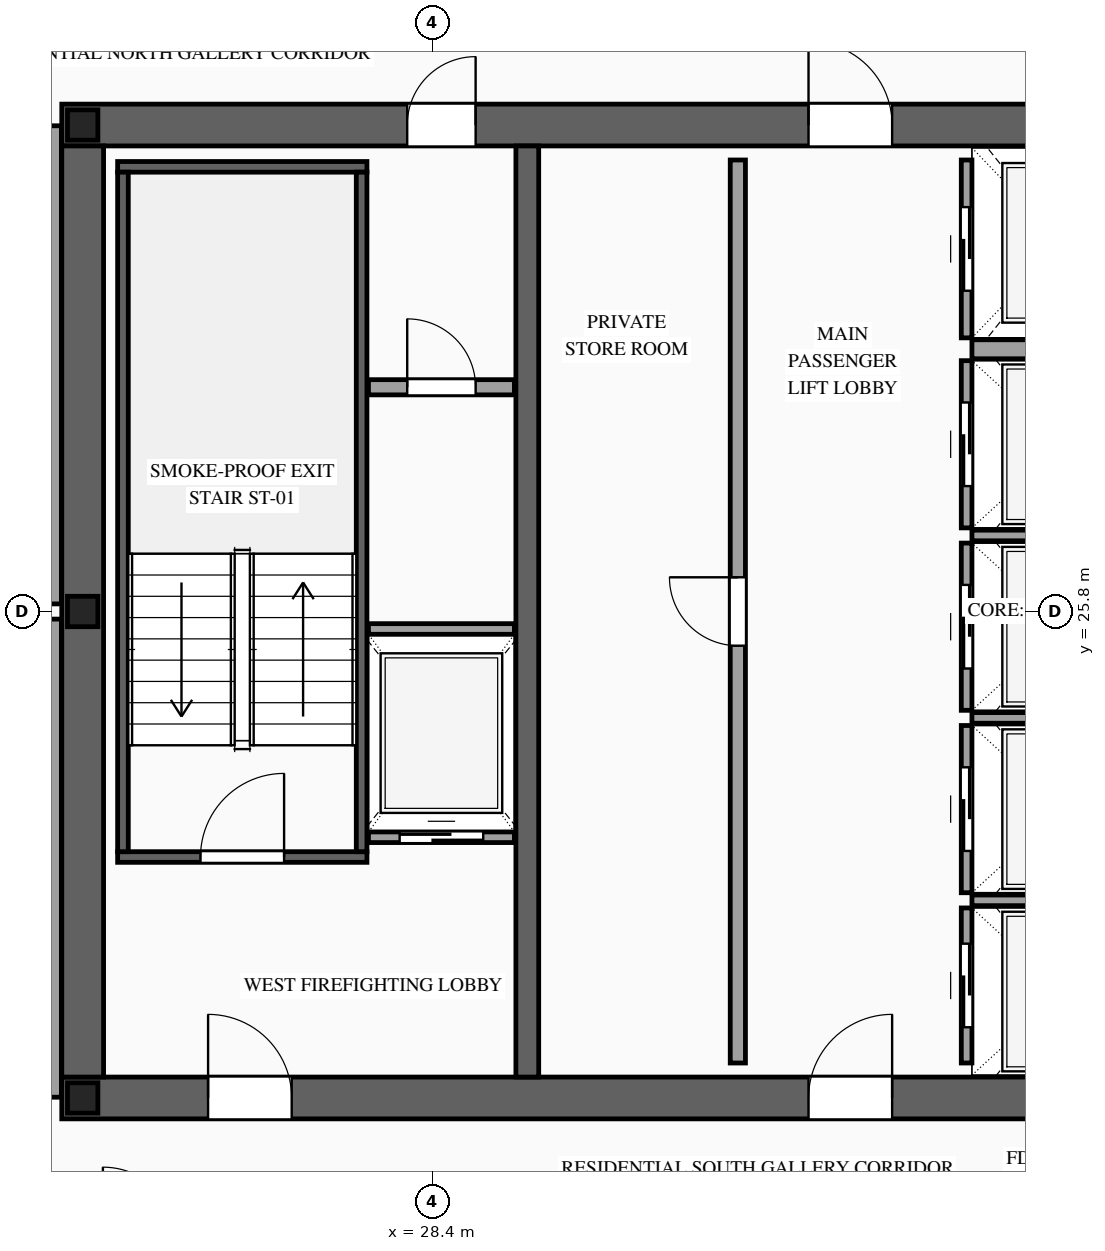
"""IFC4 building model, lengths in metres.
Left out: names, types, materials, properties, quantities, classifications, styles, units other than length and angle.
Written with IfcOpenShell. Run it as: python <this file> out.ifc"""

import sys

from ifc_helpers import new_model, si_unit, direction, frame, frame_2d, origin, origin_2d, place, context, subcontext, project, spatial, rectangle, i_section, extrude, source, transform, mapped, element, fill, save


model = new_model("IFC4")
c1 = context("Model", 3, precision=1e-05, world=origin(), true_north=direction((0.0, 1.0)))
c2 = subcontext(c1, "Body", "Model", "MODEL_VIEW")
j1 = project(units=[si_unit("LENGTHUNIT", "METRE"), si_unit("PLANEANGLEUNIT", "RADIAN")], contexts=[c1])
p1 = place(None, origin())
s1 = spatial("IfcSite", under=j1, at=p1, CompositionType="ELEMENT")
p2 = place(p1, origin())
s2 = spatial("IfcBuilding", under=s1, at=p2, CompositionType="ELEMENT")
p3 = place(p2, frame((0.0, 0.0, 252.1)))
s3 = spatial("IfcBuildingStorey", under=s2, at=p3, CompositionType="ELEMENT", Elevation=252.1)
p4 = place(p3, frame((23.525, 19.4, 0.0), z_axis=(0.0, 0.0, 1.0), x_axis=(1.0, 0.0, 0.0)))
e1 = element("IfcWall", 1, at=p4, inside=s3, PredefinedType="SHEAR", context=c2, shape_type="SweptSolid", body=[
    extrude(rectangle(XDim=26.95, YDim=0.55, at=frame_2d((13.475, 0.0))), origin(), (0.0, 0.0, 1.0), 3.5),
])
p5 = place(p4, frame((1.925, 0.0, 0.0)))
e2 = element("IfcOpeningElement", 2, at=p5, cuts=e1, PredefinedType="OPENING", context=c2, shape_type="SweptSolid", body=[
    extrude(rectangle(XDim=1.1, YDim=2.2, at=frame_2d((0.55, 1.1))), frame((0.0, 0.29, 0.0), z_axis=(0.0, -1.0, 0.0), x_axis=(1.0, 0.0, 0.0)), (0.0, 0.0, 1.0), 0.58),
])
p6 = place(p4, frame((9.825, 0.0, 0.0)))
e3 = element("IfcOpeningElement", 3, at=p6, cuts=e1, PredefinedType="OPENING", context=c2, shape_type="SweptSolid", body=[
    extrude(rectangle(XDim=1.1, YDim=2.2, at=frame_2d((0.55, 1.1))), frame((0.0, 0.29, 0.0), z_axis=(0.0, -1.0, 0.0), x_axis=(1.0, 0.0, 0.0)), (0.0, 0.0, 1.0), 0.58),
])
p7 = place(p4, frame((23.025, 0.0, 0.0)))
e4 = element("IfcOpeningElement", 4, at=p7, cuts=e1, PredefinedType="OPENING", context=c2, shape_type="SweptSolid", body=[
    extrude(rectangle(XDim=1.1, YDim=2.2, at=frame_2d((0.55, 1.1))), frame((0.0, 0.29, 0.0), z_axis=(0.0, -1.0, 0.0), x_axis=(1.0, 0.0, 0.0)), (0.0, 0.0, 1.0), 0.58),
])
p8 = place(p4, frame((19.645, 0.0, 0.0)))
e5 = element("IfcOpeningElement", 5, at=p8, cuts=e1, PredefinedType="OPENING", context=c2, shape_type="SweptSolid", body=[
    extrude(rectangle(XDim=0.9, YDim=2.15, at=frame_2d((0.45, 1.075))), frame((0.0, 0.29, 0.0), z_axis=(0.0, -1.0, 0.0), x_axis=(1.0, 0.0, 0.0)), (0.0, 0.0, 1.0), 0.58),
])
p9 = place(p4, frame((18.205, 0.0, 0.0)))
e6 = element("IfcOpeningElement", 6, at=p9, cuts=e1, PredefinedType="OPENING", context=c2, shape_type="SweptSolid", body=[
    extrude(rectangle(XDim=0.9, YDim=2.15, at=frame_2d((0.45, 1.075))), frame((0.0, 0.29, 0.0), z_axis=(0.0, -1.0, 0.0), x_axis=(1.0, 0.0, 0.0)), (0.0, 0.0, 1.0), 0.58),
])
p10 = place(p3, frame((23.525, 32.2, 0.0), z_axis=(0.0, 0.0, 1.0), x_axis=(1.0, 0.0, 0.0)))
e7 = element("IfcWall", 7, at=p10, inside=s3, PredefinedType="SHEAR", context=c2, shape_type="SweptSolid", body=[
    extrude(rectangle(XDim=26.95, YDim=0.55, at=frame_2d((13.475, 0.0))), origin(), (0.0, 0.0, 1.0), 3.5),
])
p11 = place(p10, frame((4.545, 0.0, 0.0)))
e8 = element("IfcOpeningElement", 8, at=p11, cuts=e7, PredefinedType="OPENING", context=c2, shape_type="SweptSolid", body=[
    extrude(rectangle(XDim=0.9, YDim=2.15, at=frame_2d((0.45, 1.075))), frame((0.0, 0.29, 0.0), z_axis=(0.0, -1.0, 0.0), x_axis=(1.0, 0.0, 0.0)), (0.0, 0.0, 1.0), 0.58),
])
p12 = place(p10, frame((9.825, 0.0, 0.0)))
e9 = element("IfcOpeningElement", 9, at=p12, cuts=e7, PredefinedType="OPENING", context=c2, shape_type="SweptSolid", body=[
    extrude(rectangle(XDim=1.1, YDim=2.2, at=frame_2d((0.55, 1.1))), frame((0.0, 0.29, 0.0), z_axis=(0.0, -1.0, 0.0), x_axis=(1.0, 0.0, 0.0)), (0.0, 0.0, 1.0), 0.58),
])
p13 = place(p10, frame((15.675, 0.0, 0.0)))
e10 = element("IfcOpeningElement", 10, at=p13, cuts=e7, PredefinedType="OPENING", context=c2, shape_type="SweptSolid", body=[
    extrude(rectangle(XDim=1.1, YDim=2.2, at=frame_2d((0.55, 1.1))), frame((0.0, 0.29, 0.0), z_axis=(0.0, -1.0, 0.0), x_axis=(1.0, 0.0, 0.0)), (0.0, 0.0, 1.0), 0.58),
])
m1 = source(origin(), c2, "Body", "SweptSolid", [
    extrude(rectangle(XDim=12.25, YDim=0.55, at=frame_2d((6.125, 0.0))), origin(), (0.0, 0.0, 1.0), 3.5),
])
p14 = place(p3, frame((23.8, 19.675, 0.0), z_axis=(0.0, 0.0, 1.0), x_axis=(0.0, 1.0, 0.0)))
e11 = element("IfcWall", 11, at=p14, inside=s3, PredefinedType="SHEAR", context=c2, shape_type="MappedRepresentation", body=[
    mapped(m1, transform((0.0, 0.0, 0.0), scale=1.0)),
])
m2 = source(origin(), c2, "Body", "SweptSolid", [
    extrude(rectangle(XDim=12.25, YDim=0.3, at=frame_2d((6.125, 0.0))), origin(), (0.0, 0.0, 1.0), 3.5),
])
p15 = place(p3, frame((29.65, 19.675, 0.0), z_axis=(0.0, 0.0, 1.0), x_axis=(0.0, 1.0, 0.0)))
e12 = element("IfcWall", 12, at=p15, inside=s3, PredefinedType="SOLIDWALL", context=c2, shape_type="MappedRepresentation", body=[
    mapped(m2, transform((0.0, 0.0, 0.0), scale=1.0)),
])
m3 = source(origin(), c2, "Body", "SweptSolid", [
    extrude(i_section(OverallWidth=0.4, OverallDepth=0.4, WebThickness=0.013, FlangeThickness=0.021, at=origin_2d()), origin(), (0.0, 0.0, 1.0), 3.5),
])
for number, where, z_axis, x_axis in (
    (13, (23.8, 19.4, 0.0), (0.0, 0.0, 1.0), (1.0, 0.0, 0.0)),
    (14, (23.8, 25.8, 0.0), (0.0, 0.0, 1.0), (1.0, 0.0, 0.0)),
    (15, (23.8, 32.2, 0.0), (0.0, 0.0, 1.0), (1.0, 0.0, 0.0)),
):
    element("IfcColumn", number, at=place(p3, frame(where, z_axis=z_axis, x_axis=x_axis)), inside=s3, PredefinedType="COLUMN", context=c2, shape_type="MappedRepresentation", body=[
        mapped(m3, transform((0.0, 0.0, 0.0), scale=1.0)),
    ])
p16 = place(p3, frame((27.56, 22.83, 0.0), z_axis=(0.0, 0.0, 1.0), x_axis=(1.0, 0.0, 0.0)))
e16 = element("IfcWall", 16, at=p16, inside=s3, PredefinedType="SOLIDWALL", context=c2, shape_type="SweptSolid", body=[
    extrude(rectangle(XDim=1.92, YDim=0.14, at=frame_2d((0.96, 0.0))), origin(), (0.0, 0.0, 1.0), 3.28),
])
p17 = place(p16, frame((0.41, 0.0, 0.0)))
e17 = element("IfcOpeningElement", 17, at=p17, cuts=e16, PredefinedType="OPENING", context=c2, shape_type="SweptSolid", body=[
    extrude(rectangle(XDim=1.1, YDim=2.2, at=frame_2d((0.55, 1.1))), frame((0.0, 0.085, 0.0), z_axis=(0.0, -1.0, 0.0), x_axis=(1.0, 0.0, 0.0)), (0.0, 0.0, 1.0), 0.17),
])
m4 = source(origin(), c2, "Body", "SweptSolid", [
    extrude(rectangle(XDim=1.92, YDim=0.14, at=frame_2d((0.96, 0.0))), origin(), (0.0, 0.0, 1.0), 3.28),
])
p18 = place(p3, frame((27.56, 25.57, 0.0), z_axis=(0.0, 0.0, 1.0), x_axis=(1.0, 0.0, 0.0)))
e18 = element("IfcWall", 18, at=p18, inside=s3, PredefinedType="SOLIDWALL", context=c2, shape_type="MappedRepresentation", body=[
    mapped(m4, transform((0.0, 0.0, 0.0), scale=1.0)),
])
p19 = place(p3, frame((35.43, 19.86, 0.0), z_axis=(0.0, 0.0, 1.0), x_axis=(0.0, 1.0, 0.0)))
e19 = element("IfcWall", 19, at=p19, inside=s3, PredefinedType="SOLIDWALL", context=c2, shape_type="SweptSolid", body=[
    extrude(rectangle(XDim=2.04, YDim=0.14, at=frame_2d((1.02, 0.0))), origin(), (0.0, 0.0, 1.0), 3.28),
])
p20 = place(p19, frame((0.47, 0.0, 0.0)))
e20 = element("IfcOpeningElement", 20, at=p20, cuts=e19, PredefinedType="OPENING", context=c2, shape_type="SweptSolid", body=[
    extrude(rectangle(XDim=1.1, YDim=2.2, at=frame_2d((0.55, 1.1))), frame((0.0, 0.085, 0.0), z_axis=(0.0, -1.0, 0.0), x_axis=(1.0, 0.0, 0.0)), (0.0, 0.0, 1.0), 0.17),
])
m5 = source(origin(), c2, "Body", "SweptSolid", [
    extrude(rectangle(XDim=2.4, YDim=0.14, at=frame_2d((1.2, 0.0))), origin(), (0.0, 0.0, 1.0), 3.28),
])
p21 = place(p3, frame((35.5, 22.0, 0.0), z_axis=(0.0, 0.0, 1.0), x_axis=(1.0, 0.0, 0.0)))
e21 = element("IfcWall", 21, at=p21, inside=s3, PredefinedType="SOLIDWALL", context=c2, shape_type="MappedRepresentation", body=[
    mapped(m5, transform((0.0, 0.0, 0.0), scale=1.0)),
])
p22 = place(p3, frame((35.43, 22.1, 0.0), z_axis=(0.0, 0.0, 1.0), x_axis=(0.0, 1.0, 0.0)))
e22 = element("IfcWall", 22, at=p22, inside=s3, PredefinedType="SOLIDWALL", context=c2, shape_type="SweptSolid", body=[
    extrude(rectangle(XDim=2.2, YDim=0.14, at=frame_2d((1.1, 0.0))), origin(), (0.0, 0.0, 1.0), 3.28),
])
p23 = place(p22, frame((0.55, 0.0, 0.0)))
e23 = element("IfcOpeningElement", 23, at=p23, cuts=e22, PredefinedType="OPENING", context=c2, shape_type="SweptSolid", body=[
    extrude(rectangle(XDim=1.1, YDim=2.2, at=frame_2d((0.55, 1.1))), frame((0.0, 0.085, 0.0), z_axis=(0.0, -1.0, 0.0), x_axis=(1.0, 0.0, 0.0)), (0.0, 0.0, 1.0), 0.17),
])
p24 = place(p3, frame((35.5, 24.4, 0.0), z_axis=(0.0, 0.0, 1.0), x_axis=(1.0, 0.0, 0.0)))
e24 = element("IfcWall", 24, at=p24, inside=s3, PredefinedType="SOLIDWALL", context=c2, shape_type="MappedRepresentation", body=[
    mapped(m5, transform((0.0, 0.0, 0.0), scale=1.0)),
])
p25 = place(p3, frame((35.43, 24.5, 0.0), z_axis=(0.0, 0.0, 1.0), x_axis=(0.0, 1.0, 0.0)))
e25 = element("IfcWall", 25, at=p25, inside=s3, PredefinedType="SOLIDWALL", context=c2, shape_type="SweptSolid", body=[
    extrude(rectangle(XDim=2.2, YDim=0.14, at=frame_2d((1.1, 0.0))), origin(), (0.0, 0.0, 1.0), 3.28),
])
p26 = place(p25, frame((0.55, 0.0, 0.0)))
e26 = element("IfcOpeningElement", 26, at=p26, cuts=e25, PredefinedType="OPENING", context=c2, shape_type="SweptSolid", body=[
    extrude(rectangle(XDim=1.1, YDim=2.2, at=frame_2d((0.55, 1.1))), frame((0.0, 0.085, 0.0), z_axis=(0.0, -1.0, 0.0), x_axis=(1.0, 0.0, 0.0)), (0.0, 0.0, 1.0), 0.17),
])
p27 = place(p3, frame((35.5, 26.8, 0.0), z_axis=(0.0, 0.0, 1.0), x_axis=(1.0, 0.0, 0.0)))
e27 = element("IfcWall", 27, at=p27, inside=s3, PredefinedType="SOLIDWALL", context=c2, shape_type="MappedRepresentation", body=[
    mapped(m5, transform((0.0, 0.0, 0.0), scale=1.0)),
])
p28 = place(p3, frame((35.43, 26.9, 0.0), z_axis=(0.0, 0.0, 1.0), x_axis=(0.0, 1.0, 0.0)))
e28 = element("IfcWall", 28, at=p28, inside=s3, PredefinedType="SOLIDWALL", context=c2, shape_type="SweptSolid", body=[
    extrude(rectangle(XDim=2.2, YDim=0.14, at=frame_2d((1.1, 0.0))), origin(), (0.0, 0.0, 1.0), 3.28),
])
p29 = place(p28, frame((0.55, 0.0, 0.0)))
e29 = element("IfcOpeningElement", 29, at=p29, cuts=e28, PredefinedType="OPENING", context=c2, shape_type="SweptSolid", body=[
    extrude(rectangle(XDim=1.1, YDim=2.2, at=frame_2d((0.55, 1.1))), frame((0.0, 0.085, 0.0), z_axis=(0.0, -1.0, 0.0), x_axis=(1.0, 0.0, 0.0)), (0.0, 0.0, 1.0), 0.17),
])
p30 = place(p3, frame((35.43, 29.4, 0.0), z_axis=(0.0, 0.0, 1.0), x_axis=(0.0, 1.0, 0.0)))
e30 = element("IfcWall", 30, at=p30, inside=s3, PredefinedType="SOLIDWALL", context=c2, shape_type="SweptSolid", body=[
    extrude(rectangle(XDim=2.34, YDim=0.14, at=frame_2d((1.17, 0.0))), origin(), (0.0, 0.0, 1.0), 3.28),
])
p31 = place(p30, frame((0.62, 0.0, 0.0)))
e31 = element("IfcOpeningElement", 31, at=p31, cuts=e30, PredefinedType="OPENING", context=c2, shape_type="SweptSolid", body=[
    extrude(rectangle(XDim=1.1, YDim=2.2, at=frame_2d((0.55, 1.1))), frame((0.0, 0.085, 0.0), z_axis=(0.0, -1.0, 0.0), x_axis=(1.0, 0.0, 0.0)), (0.0, 0.0, 1.0), 0.17),
])
m6 = source(origin(), c2, "Body", "SweptSolid", [
    extrude(rectangle(XDim=2.4, YDim=0.25, at=frame_2d((1.2, 0.0))), origin(), (0.0, 0.0, 1.0), 3.28),
])
p32 = place(p3, frame((35.5, 29.25, 0.0), z_axis=(0.0, 0.0, 1.0), x_axis=(1.0, 0.0, 0.0)))
e32 = element("IfcWall", 32, at=p32, inside=s3, PredefinedType="SOLIDWALL", context=c2, shape_type="MappedRepresentation", body=[
    mapped(m6, transform((0.0, 0.0, 0.0), scale=1.0)),
])
p33 = place(p3, frame((24.26, 22.57, 0.0), z_axis=(0.0, 0.0, 1.0), x_axis=(1.0, 0.0, 0.0)))
e33 = element("IfcWall", 33, at=p33, inside=s3, PredefinedType="SOLIDWALL", context=c2, shape_type="SweptSolid", body=[
    extrude(rectangle(XDim=3.28, YDim=0.14, at=frame_2d((1.64, 0.0))), origin(), (0.0, 0.0, 1.0), 3.28),
])
p34 = place(p33, frame((1.09, 0.0, 0.0)))
e34 = element("IfcOpeningElement", 34, at=p34, cuts=e33, PredefinedType="OPENING", context=c2, shape_type="SweptSolid", body=[
    extrude(rectangle(XDim=1.1, YDim=2.2, at=frame_2d((0.55, 1.1))), frame((0.0, 0.085, 0.0), z_axis=(0.0, -1.0, 0.0), x_axis=(1.0, 0.0, 0.0)), (0.0, 0.0, 1.0), 0.17),
])
m7 = source(origin(), c2, "Body", "SweptSolid", [
    extrude(rectangle(XDim=3.28, YDim=0.14, at=frame_2d((1.64, 0.0))), origin(), (0.0, 0.0, 1.0), 3.28),
])
p35 = place(p3, frame((24.26, 31.65, 0.0), z_axis=(0.0, 0.0, 1.0), x_axis=(1.0, 0.0, 0.0)))
e35 = element("IfcWall", 35, at=p35, inside=s3, PredefinedType="SOLIDWALL", context=c2, shape_type="MappedRepresentation", body=[
    mapped(m7, transform((0.0, 0.0, 0.0), scale=1.0)),
])
m8 = source(origin(), c2, "Body", "SweptSolid", [
    extrude(rectangle(XDim=8.94, YDim=0.14, at=frame_2d((4.47, 0.0))), origin(), (0.0, 0.0, 1.0), 3.28),
])
for number, where, z_axis, x_axis in (
    (36, (24.33, 22.64, 0.0), (0.0, 0.0, 1.0), (0.0, 1.0, 0.0)),
    (37, (27.47, 22.64, 0.0), (0.0, 0.0, 1.0), (0.0, 1.0, 0.0)),
):
    element("IfcWall", number, at=place(p3, frame(where, z_axis=z_axis, x_axis=x_axis)), inside=s3, PredefinedType="SOLIDWALL", context=c2, shape_type="MappedRepresentation", body=[
        mapped(m8, transform((0.0, 0.0, 0.0), scale=1.0)),
    ])
p36 = place(p3, frame((27.56, 28.75, 0.0), z_axis=(0.0, 0.0, 1.0), x_axis=(1.0, 0.0, 0.0)))
e38 = element("IfcWall", 38, at=p36, inside=s3, PredefinedType="PARTITIONING", context=c2, shape_type="SweptSolid", body=[
    extrude(rectangle(XDim=1.92, YDim=0.2, at=frame_2d((0.96, 0.0))), origin(), (0.0, 0.0, 1.0), 3.28),
])
p37 = place(p36, frame((0.51, 0.0, 0.0)))
e39 = element("IfcOpeningElement", 39, at=p37, cuts=e38, PredefinedType="OPENING", context=c2, shape_type="SweptSolid", body=[
    extrude(rectangle(XDim=0.9, YDim=2.15, at=frame_2d((0.45, 1.075))), frame((0.0, 0.115, 0.0), z_axis=(0.0, -1.0, 0.0), x_axis=(1.0, 0.0, 0.0)), (0.0, 0.0, 1.0), 0.23),
])
p38 = place(p3, frame((32.42, 19.86, 0.0), z_axis=(0.0, 0.0, 1.0), x_axis=(0.0, 1.0, 0.0)))
e40 = element("IfcWall", 40, at=p38, inside=s3, PredefinedType="PARTITIONING", context=c2, shape_type="SweptSolid", body=[
    extrude(rectangle(XDim=11.88, YDim=0.2, at=frame_2d((5.94, 0.0))), origin(), (0.0, 0.0, 1.0), 3.28),
])
p39 = place(p38, frame((5.49, 0.0, 0.0)))
e41 = element("IfcOpeningElement", 41, at=p39, cuts=e40, PredefinedType="OPENING", context=c2, shape_type="SweptSolid", body=[
    extrude(rectangle(XDim=0.9, YDim=2.15, at=frame_2d((0.45, 1.075))), frame((0.0, 0.115, 0.0), z_axis=(0.0, -1.0, 0.0), x_axis=(1.0, 0.0, 0.0)), (0.0, 0.0, 1.0), 0.23),
])
m9 = source(origin(), c2, "Body", "SweptSolid", [
    extrude(rectangle(XDim=6.29, YDim=0.2, at=frame_2d((3.145, 0.0))), origin(), (0.0, 0.0, 1.0), 3.28),
])
for number, where, z_axis, x_axis in (
    (42, (23.42, 19.41, 0.0), (0.0, 0.0, 1.0), (0.0, 1.0, 0.0)),
    (43, (23.42, 25.9, 0.0), (0.0, 0.0, 1.0), (0.0, 1.0, 0.0)),
):
    element("IfcWall", number, at=place(p3, frame(where, z_axis=z_axis, x_axis=x_axis)), inside=s3, PredefinedType="PARTITIONING", context=c2, shape_type="MappedRepresentation", body=[
        mapped(m9, transform((0.0, 0.0, 0.0), scale=1.0)),
    ])
m10 = source(origin(), c2, "Body", "SweptSolid", [
    extrude(rectangle(XDim=1.1, YDim=2.2, at=frame_2d((0.55, 1.1))), frame((0.0, 0.025, 0.0), z_axis=(0.0, -1.0, 0.0), x_axis=(1.0, 0.0, 0.0)), (0.0, 0.0, 1.0), 0.05),
])
p40 = place(p17, origin())
e44 = element("IfcDoor", 44, at=p40, inside=s3, OperationType="SLIDING_TO_LEFT", PredefinedType="DOOR", context=c2, shape_type="MappedRepresentation", body=[
    mapped(m10, transform((0.0, 0.0, 0.0), scale=1.0)),
])
fill(e17, e44)
p41 = place(p20, origin())
e45 = element("IfcDoor", 45, at=p41, inside=s3, OperationType="SLIDING_TO_RIGHT", PredefinedType="DOOR", context=c2, shape_type="MappedRepresentation", body=[
    mapped(m10, transform((0.0, 0.0, 0.0), scale=1.0)),
])
fill(e20, e45)
p42 = place(p23, origin())
e46 = element("IfcDoor", 46, at=p42, inside=s3, OperationType="SLIDING_TO_LEFT", PredefinedType="DOOR", context=c2, shape_type="MappedRepresentation", body=[
    mapped(m10, transform((0.0, 0.0, 0.0), scale=1.0)),
])
fill(e23, e46)
p43 = place(p26, origin())
e47 = element("IfcDoor", 47, at=p43, inside=s3, OperationType="SLIDING_TO_RIGHT", PredefinedType="DOOR", context=c2, shape_type="MappedRepresentation", body=[
    mapped(m10, transform((0.0, 0.0, 0.0), scale=1.0)),
])
fill(e26, e47)
p44 = place(p29, origin())
e48 = element("IfcDoor", 48, at=p44, inside=s3, OperationType="SLIDING_TO_LEFT", PredefinedType="DOOR", context=c2, shape_type="MappedRepresentation", body=[
    mapped(m10, transform((0.0, 0.0, 0.0), scale=1.0)),
])
fill(e29, e48)
p45 = place(p31, origin())
e49 = element("IfcDoor", 49, at=p45, inside=s3, OperationType="SLIDING_TO_RIGHT", PredefinedType="DOOR", context=c2, shape_type="MappedRepresentation", body=[
    mapped(m10, transform((0.0, 0.0, 0.0), scale=1.0)),
])
fill(e31, e49)
m11 = source(origin(), c2, "Body", "SweptSolid", [
    extrude(rectangle(XDim=1.1, YDim=2.2, at=frame_2d((0.55, 1.1))), frame((0.0, 0.025, 0.0), z_axis=(0.0, -1.0, 0.0), x_axis=(1.0, 0.0, 0.0)), (0.0, 0.0, 1.0), 0.05),
])
p46 = place(p34, origin())
e50 = element("IfcDoor", 50, at=p46, inside=s3, OperationType="SINGLE_SWING_RIGHT", PredefinedType="DOOR", context=c2, shape_type="MappedRepresentation", body=[
    mapped(m11, transform((0.0, 0.0, 0.0), scale=1.0)),
])
fill(e34, e50)
p47 = place(p5, origin())
e51 = element("IfcDoor", 51, at=p47, inside=s3, OperationType="SINGLE_SWING_LEFT", PredefinedType="DOOR", context=c2, shape_type="MappedRepresentation", body=[
    mapped(m11, transform((0.0, 0.0, 0.0), scale=1.0)),
])
fill(e2, e51)
p48 = place(p6, origin())
e52 = element("IfcDoor", 52, at=p48, inside=s3, OperationType="SINGLE_SWING_RIGHT", PredefinedType="DOOR", context=c2, shape_type="MappedRepresentation", body=[
    mapped(m11, transform((0.0, 0.0, 0.0), scale=1.0)),
])
fill(e3, e52)
m12 = source(origin(), c2, "Body", "SweptSolid", [
    extrude(rectangle(XDim=0.9, YDim=2.15, at=frame_2d((0.45, 1.075))), frame((0.0, 0.025, 0.0), z_axis=(0.0, -1.0, 0.0), x_axis=(1.0, 0.0, 0.0)), (0.0, 0.0, 1.0), 0.05),
])
p49 = place(p11, origin())
e53 = element("IfcDoor", 53, at=p49, inside=s3, OperationType="SINGLE_SWING_RIGHT", PredefinedType="DOOR", context=c2, shape_type="MappedRepresentation", body=[
    mapped(m12, transform((0.0, 0.0, 0.0), scale=1.0)),
])
fill(e8, e53)
p50 = place(p12, origin())
e54 = element("IfcDoor", 54, at=p50, inside=s3, OperationType="SINGLE_SWING_LEFT", PredefinedType="DOOR", context=c2, shape_type="MappedRepresentation", body=[
    mapped(m11, transform((0.0, 0.0, 0.0), scale=1.0)),
])
fill(e9, e54)
p51 = place(p37, origin())
e55 = element("IfcDoor", 55, at=p51, inside=s3, OperationType="SINGLE_SWING_LEFT", PredefinedType="DOOR", context=c2, shape_type="MappedRepresentation", body=[
    mapped(m12, transform((0.0, 0.0, 0.0), scale=1.0)),
])
fill(e39, e55)
p52 = place(p39, origin())
e56 = element("IfcDoor", 56, at=p52, inside=s3, OperationType="SINGLE_SWING_RIGHT", PredefinedType="DOOR", context=c2, shape_type="MappedRepresentation", body=[
    mapped(m12, transform((0.0, 0.0, 0.0), scale=1.0)),
])
fill(e41, e56)
save(model, sys.argv[1])
